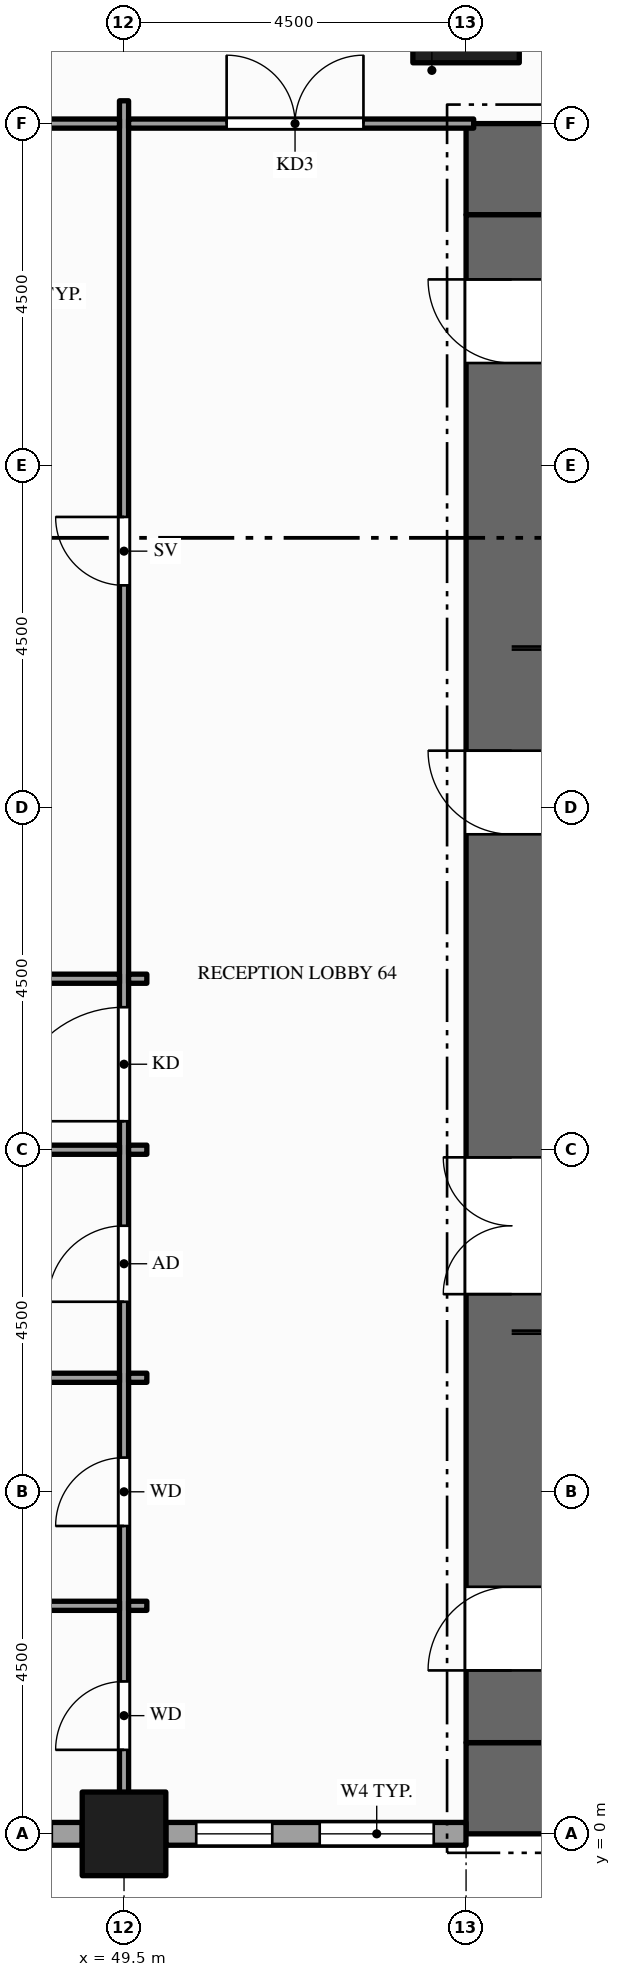
"""IFC4 building model, lengths in metres.
Left out: names, types, materials, properties, quantities, classifications, styles, units other than length and angle.
Written with IfcOpenShell. Run it as: python <this file> out.ifc"""

import sys

from ifc_helpers import new_model, si_unit, direction, frame, frame_2d, origin, origin_2d, place, context, subcontext, project, spatial, rectangle, hollow_rectangle, extrude, element, fill, save


model = new_model("IFC4")
c1 = context("Model", 3, precision=1e-05, world=origin(), true_north=direction((0.0, 1.0)))
c2 = subcontext(c1, "Body", "Model", "MODEL_VIEW")
j1 = project(units=[si_unit("LENGTHUNIT", "METRE"), si_unit("PLANEANGLEUNIT", "RADIAN")], contexts=[c1])
p1 = place(None, origin())
s1 = spatial("IfcSite", under=j1, at=p1, CompositionType="ELEMENT")
p2 = place(p1, origin())
s2 = spatial("IfcBuilding", under=s1, at=p2, CompositionType="ELEMENT")
p3 = place(p2, frame((0.0, 0.0, 19.0)))
s3 = spatial("IfcBuildingStorey", under=s2, at=p3, CompositionType="ELEMENT", Elevation=19.0)
for number, where, z_axis, x_axis in (
    (1, (67.5, 0.6, -0.15), (0.0, 0.0, 1.0), (-1.0, 0.0, 0.0)),
    (2, (54.0, 21.9, -0.15), (0.0, 0.0, 1.0), (1.0, 0.0, 0.0)),
):
    element("IfcWall", number, at=place(p3, frame(where, z_axis=z_axis, x_axis=x_axis)), inside=s3, PredefinedType="SHEAR", context=c2, shape_type="SweptSolid", body=[
        extrude(rectangle(XDim=13.5, YDim=1.2, at=frame_2d((6.75, 0.0))), origin(), (0.0, 0.0, 1.0), 5.0),
    ])
p4 = place(p3, frame((54.6, 1.2, -0.15), z_axis=(0.0, 0.0, 1.0), x_axis=(0.0, 1.0, 0.0)))
e3 = element("IfcWall", 3, at=p4, inside=s3, PredefinedType="SHEAR", context=c2, shape_type="SweptSolid", body=[
    extrude(rectangle(XDim=20.1, YDim=1.2, at=frame_2d((10.05, 0.0))), origin(), (0.0, 0.0, 1.0), 5.0),
])
p5 = place(p4, frame((5.9, 0.0, 0.15)))
e4 = element("IfcOpeningElement", 4, at=p5, cuts=e3, PredefinedType="OPENING", context=c2, shape_type="SweptSolid", body=[
    extrude(rectangle(XDim=1.8, YDim=2.1, at=frame_2d((0.9, 1.05))), frame((0.0, 0.61, 0.0), z_axis=(0.0, -1.0, 0.0), x_axis=(1.0, 0.0, 0.0)), (0.0, 0.0, 1.0), 1.22),
])
p6 = place(p4, frame((11.95, 0.0, 0.15)))
e5 = element("IfcOpeningElement", 5, at=p6, cuts=e3, PredefinedType="OPENING", context=c2, shape_type="SweptSolid", body=[
    extrude(rectangle(XDim=1.1, YDim=2.1, at=frame_2d((0.55, 1.05))), frame((0.0, 0.61, 0.0), z_axis=(0.0, -1.0, 0.0), x_axis=(1.0, 0.0, 0.0)), (0.0, 0.0, 1.0), 1.22),
])
p7 = place(p4, frame((0.95, 0.0, 0.15)))
e6 = element("IfcOpeningElement", 6, at=p7, cuts=e3, PredefinedType="OPENING", context=c2, shape_type="SweptSolid", body=[
    extrude(rectangle(XDim=1.1, YDim=2.1, at=frame_2d((0.55, 1.05))), frame((0.0, 0.61, 0.0), z_axis=(0.0, -1.0, 0.0), x_axis=(1.0, 0.0, 0.0)), (0.0, 0.0, 1.0), 1.22),
])
p8 = place(p4, frame((18.15, 0.0, 0.15)))
e7 = element("IfcOpeningElement", 7, at=p8, cuts=e3, PredefinedType="OPENING", context=c2, shape_type="SweptSolid", body=[
    extrude(rectangle(XDim=1.1, YDim=2.1, at=frame_2d((0.55, 1.05))), frame((0.0, 0.61, 0.0), z_axis=(0.0, -1.0, 0.0), x_axis=(1.0, 0.0, 0.0)), (0.0, 0.0, 1.0), 1.22),
])
p9 = place(p3, frame((49.5, 0.0, -0.25), z_axis=(0.0, 0.0, 1.0), x_axis=(1.0, 0.0, 0.0)))
e8 = element("IfcColumn", 8, at=p9, inside=s3, PredefinedType="COLUMN", context=c2, shape_type="SweptSolid", body=[
    extrude(hollow_rectangle(XDim=1.1, YDim=1.1, WallThickness=0.06, at=origin_2d()), origin(), (0.0, 0.0, 1.0), 5.0),
])
p10 = place(p3, frame((54.0, 24.0, -0.25), z_axis=(0.0, 0.0, 1.0), x_axis=(1.0, 0.0, 0.0)))
e9 = element("IfcColumn", 9, at=p10, inside=s3, PredefinedType="COLUMN", context=c2, shape_type="SweptSolid", body=[
    extrude(hollow_rectangle(XDim=1.4, YDim=1.4, WallThickness=0.08, at=origin_2d()), origin(), (0.0, 0.0, 1.0), 5.0),
])
p11 = place(p3, frame((45.55, 0.0, 0.0), z_axis=(0.0, 0.0, 1.0), x_axis=(1.0, 0.0, 0.0)))
e10 = element("IfcWall", 10, at=p11, inside=s3, PredefinedType="STANDARD", context=c2, shape_type="SweptSolid", body=[
    extrude(rectangle(XDim=3.4, YDim=0.3, at=frame_2d((1.7, 0.0))), origin(), (0.0, 0.0, 1.0), 4.036),
])
p12 = place(p11, frame((0.4, 0.0, 0.9)))
e11 = element("IfcOpeningElement", 11, at=p12, cuts=e10, PredefinedType="OPENING", context=c2, shape_type="SweptSolid", body=[
    extrude(rectangle(XDim=1.0, YDim=2.75, at=frame_2d((0.5, 1.375))), frame((0.0, 0.16, 0.0), z_axis=(0.0, -1.0, 0.0), x_axis=(1.0, 0.0, 0.0)), (0.0, 0.0, 1.0), 0.32),
])
p13 = place(p11, frame((2.0, 0.0, 0.9)))
e12 = element("IfcOpeningElement", 12, at=p13, cuts=e10, PredefinedType="OPENING", context=c2, shape_type="SweptSolid", body=[
    extrude(rectangle(XDim=1.0, YDim=2.75, at=frame_2d((0.5, 1.375))), frame((0.0, 0.16, 0.0), z_axis=(0.0, -1.0, 0.0), x_axis=(1.0, 0.0, 0.0)), (0.0, 0.0, 1.0), 0.32),
])
p14 = place(p3, frame((50.05, 0.0, 0.0), z_axis=(0.0, 0.0, 1.0), x_axis=(1.0, 0.0, 0.0)))
e13 = element("IfcWall", 13, at=p14, inside=s3, PredefinedType="STANDARD", context=c2, shape_type="SweptSolid", body=[
    extrude(rectangle(XDim=3.949, YDim=0.3, at=frame_2d((1.975, 0.0))), origin(), (0.0, 0.0, 1.0), 4.036),
])
p15 = place(p14, frame((0.4, 0.0, 0.9)))
e14 = element("IfcOpeningElement", 14, at=p15, cuts=e13, PredefinedType="OPENING", context=c2, shape_type="SweptSolid", body=[
    extrude(rectangle(XDim=1.0, YDim=2.75, at=frame_2d((0.5, 1.375))), frame((0.0, 0.16, 0.0), z_axis=(0.0, -1.0, 0.0), x_axis=(1.0, 0.0, 0.0)), (0.0, 0.0, 1.0), 0.32),
])
p16 = place(p14, frame((2.024, 0.0, 0.9)))
e15 = element("IfcOpeningElement", 15, at=p16, cuts=e13, PredefinedType="OPENING", context=c2, shape_type="SweptSolid", body=[
    extrude(rectangle(XDim=1.5, YDim=2.75, at=frame_2d((0.75, 1.375))), frame((0.0, 0.16, 0.0), z_axis=(0.0, -1.0, 0.0), x_axis=(1.0, 0.0, 0.0)), (0.0, 0.0, 1.0), 0.32),
])
p17 = place(p3, frame((49.5, 0.15, 0.0), z_axis=(0.0, 0.0, 1.0), x_axis=(0.0, 1.0, 0.0)))
e16 = element("IfcWall", 16, at=p17, inside=s3, PredefinedType="PARTITIONING", context=c2, shape_type="SweptSolid", body=[
    extrude(rectangle(XDim=22.65, YDim=0.12, at=frame_2d((11.325, 0.0))), origin(), (0.0, 0.0, 1.0), 3.759),
])
p18 = place(p17, frame((0.955, 0.0, 0.0)))
e17 = element("IfcOpeningElement", 17, at=p18, cuts=e16, PredefinedType="OPENING", context=c2, shape_type="SweptSolid", body=[
    extrude(rectangle(XDim=0.9, YDim=2.1, at=frame_2d((0.45, 1.05))), frame((0.0, 0.07, 0.0), z_axis=(0.0, -1.0, 0.0), x_axis=(1.0, 0.0, 0.0)), (0.0, 0.0, 1.0), 0.14),
])
p19 = place(p17, frame((3.9, 0.0, 0.0)))
e18 = element("IfcOpeningElement", 18, at=p19, cuts=e16, PredefinedType="OPENING", context=c2, shape_type="SweptSolid", body=[
    extrude(rectangle(XDim=0.9, YDim=2.1, at=frame_2d((0.45, 1.05))), frame((0.0, 0.07, 0.0), z_axis=(0.0, -1.0, 0.0), x_axis=(1.0, 0.0, 0.0)), (0.0, 0.0, 1.0), 0.14),
])
p20 = place(p17, frame((6.85, 0.0, 0.0)))
e19 = element("IfcOpeningElement", 19, at=p20, cuts=e16, PredefinedType="OPENING", context=c2, shape_type="SweptSolid", body=[
    extrude(rectangle(XDim=1.0, YDim=2.1, at=frame_2d((0.5, 1.05))), frame((0.0, 0.07, 0.0), z_axis=(0.0, -1.0, 0.0), x_axis=(1.0, 0.0, 0.0)), (0.0, 0.0, 1.0), 0.14),
])
p21 = place(p17, frame((16.275, 0.0, 0.0)))
e20 = element("IfcOpeningElement", 20, at=p21, cuts=e16, PredefinedType="OPENING", context=c2, shape_type="SweptSolid", body=[
    extrude(rectangle(XDim=0.9, YDim=2.1, at=frame_2d((0.45, 1.05))), frame((0.0, 0.07, 0.0), z_axis=(0.0, -1.0, 0.0), x_axis=(1.0, 0.0, 0.0)), (0.0, 0.0, 1.0), 0.14),
])
p22 = place(p17, frame((9.225, 0.0, 0.0)))
e21 = element("IfcOpeningElement", 21, at=p22, cuts=e16, PredefinedType="OPENING", context=c2, shape_type="SweptSolid", body=[
    extrude(rectangle(XDim=1.5, YDim=2.1, at=frame_2d((0.75, 1.05))), frame((0.0, 0.07, 0.0), z_axis=(0.0, -1.0, 0.0), x_axis=(1.0, 0.0, 0.0)), (0.0, 0.0, 1.0), 0.14),
])
p23 = place(p3, frame((45.06, 3.0, 0.0), z_axis=(0.0, 0.0, 1.0), x_axis=(1.0, 0.0, 0.0)))
e22 = element("IfcWall", 22, at=p23, inside=s3, PredefinedType="PARTITIONING", context=c2, shape_type="SweptSolid", body=[
    extrude(rectangle(XDim=4.38, YDim=0.12, at=frame_2d((2.19, 0.0))), origin(), (0.0, 0.0, 1.0), 3.66),
])
p24 = place(p3, frame((49.56, 3.0, 0.0), z_axis=(0.0, 0.0, 1.0), x_axis=(1.0, 0.0, 0.0)))
e23 = element("IfcWall", 23, at=p24, inside=s3, PredefinedType="PARTITIONING", context=c2, shape_type="SweptSolid", body=[
    extrude(rectangle(XDim=0.24, YDim=0.12, at=frame_2d((0.12, 0.0))), origin(), (0.0, 0.0, 1.0), 3.759),
])
p25 = place(p3, frame((45.06, 6.0, 0.0), z_axis=(0.0, 0.0, 1.0), x_axis=(1.0, 0.0, 0.0)))
e24 = element("IfcWall", 24, at=p25, inside=s3, PredefinedType="PARTITIONING", context=c2, shape_type="SweptSolid", body=[
    extrude(rectangle(XDim=4.38, YDim=0.12, at=frame_2d((2.19, 0.0))), origin(), (0.0, 0.0, 1.0), 3.66),
])
p26 = place(p3, frame((49.56, 6.0, 0.0), z_axis=(0.0, 0.0, 1.0), x_axis=(1.0, 0.0, 0.0)))
e25 = element("IfcWall", 25, at=p26, inside=s3, PredefinedType="PARTITIONING", context=c2, shape_type="SweptSolid", body=[
    extrude(rectangle(XDim=0.24, YDim=0.12, at=frame_2d((0.12, 0.0))), origin(), (0.0, 0.0, 1.0), 3.759),
])
p27 = place(p3, frame((45.06, 9.0, 0.0), z_axis=(0.0, 0.0, 1.0), x_axis=(1.0, 0.0, 0.0)))
e26 = element("IfcWall", 26, at=p27, inside=s3, PredefinedType="PARTITIONING", context=c2, shape_type="SweptSolid", body=[
    extrude(rectangle(XDim=4.38, YDim=0.12, at=frame_2d((2.19, 0.0))), origin(), (0.0, 0.0, 1.0), 3.66),
])
p28 = place(p3, frame((49.56, 9.0, 0.0), z_axis=(0.0, 0.0, 1.0), x_axis=(1.0, 0.0, 0.0)))
e27 = element("IfcWall", 27, at=p28, inside=s3, PredefinedType="PARTITIONING", context=c2, shape_type="SweptSolid", body=[
    extrude(rectangle(XDim=0.24, YDim=0.12, at=frame_2d((0.12, 0.0))), origin(), (0.0, 0.0, 1.0), 3.759),
])
p29 = place(p3, frame((45.06, 11.25, 0.0), z_axis=(0.0, 0.0, 1.0), x_axis=(1.0, 0.0, 0.0)))
e28 = element("IfcWall", 28, at=p29, inside=s3, PredefinedType="PARTITIONING", context=c2, shape_type="SweptSolid", body=[
    extrude(rectangle(XDim=4.38, YDim=0.12, at=frame_2d((2.19, 0.0))), origin(), (0.0, 0.0, 1.0), 3.66),
])
p30 = place(p3, frame((49.56, 11.25, 0.0), z_axis=(0.0, 0.0, 1.0), x_axis=(1.0, 0.0, 0.0)))
e29 = element("IfcWall", 29, at=p30, inside=s3, PredefinedType="PARTITIONING", context=c2, shape_type="SweptSolid", body=[
    extrude(rectangle(XDim=0.24, YDim=0.12, at=frame_2d((0.12, 0.0))), origin(), (0.0, 0.0, 1.0), 3.759),
])
p31 = place(p3, frame((45.06, 22.5, 0.0), z_axis=(0.0, 0.0, 1.0), x_axis=(1.0, 0.0, 0.0)))
e30 = element("IfcWall", 30, at=p31, inside=s3, PredefinedType="PARTITIONING", context=c2, shape_type="SweptSolid", body=[
    extrude(rectangle(XDim=4.38, YDim=0.12, at=frame_2d((2.19, 0.0))), origin(), (0.0, 0.0, 1.0), 3.66),
])
p32 = place(p3, frame((49.56, 22.5, 0.0), z_axis=(0.0, 0.0, 1.0), x_axis=(1.0, 0.0, 0.0)))
e31 = element("IfcWall", 31, at=p32, inside=s3, PredefinedType="PARTITIONING", context=c2, shape_type="SweptSolid", body=[
    extrude(rectangle(XDim=4.54, YDim=0.12, at=frame_2d((2.27, 0.0))), origin(), (0.0, 0.0, 1.0), 3.66),
])
p33 = place(p32, frame((1.29, 0.0, 0.0)))
e32 = element("IfcOpeningElement", 32, at=p33, cuts=e31, PredefinedType="OPENING", context=c2, shape_type="SweptSolid", body=[
    extrude(rectangle(XDim=1.8, YDim=2.1, at=frame_2d((0.9, 1.05))), frame((0.0, 0.07, 0.0), z_axis=(0.0, -1.0, 0.0), x_axis=(1.0, 0.0, 0.0)), (0.0, 0.0, 1.0), 0.14),
])
p34 = place(p15, origin())
e33 = element("IfcWindow", 33, at=p34, inside=s3, PartitioningType="SINGLE_PANEL", PredefinedType="WINDOW", context=c2, shape_type="SweptSolid", body=[
    extrude(rectangle(XDim=1.0, YDim=2.75, at=frame_2d((0.5, 1.375))), frame((0.0, 0.03, 0.0), z_axis=(0.0, -1.0, 0.0), x_axis=(1.0, 0.0, 0.0)), (0.0, 0.0, 1.0), 0.06),
])
fill(e14, e33)
p35 = place(p16, origin())
e34 = element("IfcWindow", 34, at=p35, inside=s3, PartitioningType="SINGLE_PANEL", PredefinedType="WINDOW", context=c2, shape_type="SweptSolid", body=[
    extrude(rectangle(XDim=1.5, YDim=2.75, at=frame_2d((0.75, 1.375))), frame((0.0, 0.03, 0.0), z_axis=(0.0, -1.0, 0.0), x_axis=(1.0, 0.0, 0.0)), (0.0, 0.0, 1.0), 0.06),
])
fill(e15, e34)
p36 = place(p5, origin())
e35 = element("IfcDoor", 35, at=p36, inside=s3, OperationType="DOUBLE_DOOR_SINGLE_SWING", PredefinedType="DOOR", context=c2, shape_type="SweptSolid", body=[
    extrude(rectangle(XDim=1.8, YDim=2.1, at=frame_2d((0.9, 1.05))), frame((0.0, 0.025, 0.0), z_axis=(0.0, -1.0, 0.0), x_axis=(1.0, 0.0, 0.0)), (0.0, 0.0, 1.0), 0.05),
])
fill(e4, e35)
p37 = place(p6, origin())
e36 = element("IfcDoor", 36, at=p37, inside=s3, OperationType="SINGLE_SWING_RIGHT", PredefinedType="DOOR", context=c2, shape_type="SweptSolid", body=[
    extrude(rectangle(XDim=1.1, YDim=2.1, at=frame_2d((0.55, 1.05))), frame((0.0, 0.025, 0.0), z_axis=(0.0, -1.0, 0.0), x_axis=(1.0, 0.0, 0.0)), (0.0, 0.0, 1.0), 0.05),
])
fill(e5, e36)
p38 = place(p7, origin())
e37 = element("IfcDoor", 37, at=p38, inside=s3, OperationType="SINGLE_SWING_LEFT", PredefinedType="DOOR", context=c2, shape_type="SweptSolid", body=[
    extrude(rectangle(XDim=1.1, YDim=2.1, at=frame_2d((0.55, 1.05))), frame((0.0, 0.025, 0.0), z_axis=(0.0, -1.0, 0.0), x_axis=(1.0, 0.0, 0.0)), (0.0, 0.0, 1.0), 0.05),
])
fill(e6, e37)
p39 = place(p8, origin())
e38 = element("IfcDoor", 38, at=p39, inside=s3, OperationType="SINGLE_SWING_RIGHT", PredefinedType="DOOR", context=c2, shape_type="SweptSolid", body=[
    extrude(rectangle(XDim=1.1, YDim=2.1, at=frame_2d((0.55, 1.05))), frame((0.0, 0.025, 0.0), z_axis=(0.0, -1.0, 0.0), x_axis=(1.0, 0.0, 0.0)), (0.0, 0.0, 1.0), 0.05),
])
fill(e7, e38)
p40 = place(p18, origin())
e39 = element("IfcDoor", 39, at=p40, inside=s3, OperationType="SINGLE_SWING_LEFT", PredefinedType="DOOR", context=c2, shape_type="SweptSolid", body=[
    extrude(rectangle(XDim=0.9, YDim=2.1, at=frame_2d((0.45, 1.05))), frame((0.0, 0.025, 0.0), z_axis=(0.0, -1.0, 0.0), x_axis=(1.0, 0.0, 0.0)), (0.0, 0.0, 1.0), 0.05),
])
fill(e17, e39)
p41 = place(p19, origin())
e40 = element("IfcDoor", 40, at=p41, inside=s3, OperationType="SINGLE_SWING_LEFT", PredefinedType="DOOR", context=c2, shape_type="SweptSolid", body=[
    extrude(rectangle(XDim=0.9, YDim=2.1, at=frame_2d((0.45, 1.05))), frame((0.0, 0.025, 0.0), z_axis=(0.0, -1.0, 0.0), x_axis=(1.0, 0.0, 0.0)), (0.0, 0.0, 1.0), 0.05),
])
fill(e18, e40)
p42 = place(p20, origin())
e41 = element("IfcDoor", 41, at=p42, inside=s3, OperationType="SINGLE_SWING_LEFT", PredefinedType="DOOR", context=c2, shape_type="SweptSolid", body=[
    extrude(rectangle(XDim=1.0, YDim=2.1, at=frame_2d((0.5, 1.05))), frame((0.0, 0.025, 0.0), z_axis=(0.0, -1.0, 0.0), x_axis=(1.0, 0.0, 0.0)), (0.0, 0.0, 1.0), 0.05),
])
fill(e19, e41)
p43 = place(p21, origin())
e42 = element("IfcDoor", 42, at=p43, inside=s3, OperationType="SINGLE_SWING_RIGHT", PredefinedType="DOOR", context=c2, shape_type="SweptSolid", body=[
    extrude(rectangle(XDim=0.9, YDim=2.1, at=frame_2d((0.45, 1.05))), frame((0.0, 0.025, 0.0), z_axis=(0.0, -1.0, 0.0), x_axis=(1.0, 0.0, 0.0)), (0.0, 0.0, 1.0), 0.05),
])
fill(e20, e42)
p44 = place(p22, origin())
e43 = element("IfcDoor", 43, at=p44, inside=s3, OperationType="SINGLE_SWING_LEFT", PredefinedType="DOOR", context=c2, shape_type="SweptSolid", body=[
    extrude(rectangle(XDim=1.5, YDim=2.1, at=frame_2d((0.75, 1.05))), frame((0.0, 0.025, 0.0), z_axis=(0.0, -1.0, 0.0), x_axis=(1.0, 0.0, 0.0)), (0.0, 0.0, 1.0), 0.05),
])
fill(e21, e43)
p45 = place(p33, origin())
e44 = element("IfcDoor", 44, at=p45, inside=s3, OperationType="DOUBLE_DOOR_SINGLE_SWING", PredefinedType="DOOR", context=c2, shape_type="SweptSolid", body=[
    extrude(rectangle(XDim=1.8, YDim=2.1, at=frame_2d((0.9, 1.05))), frame((0.0, 0.025, 0.0), z_axis=(0.0, -1.0, 0.0), x_axis=(1.0, 0.0, 0.0)), (0.0, 0.0, 1.0), 0.05),
])
fill(e32, e44)
save(model, sys.argv[1])
